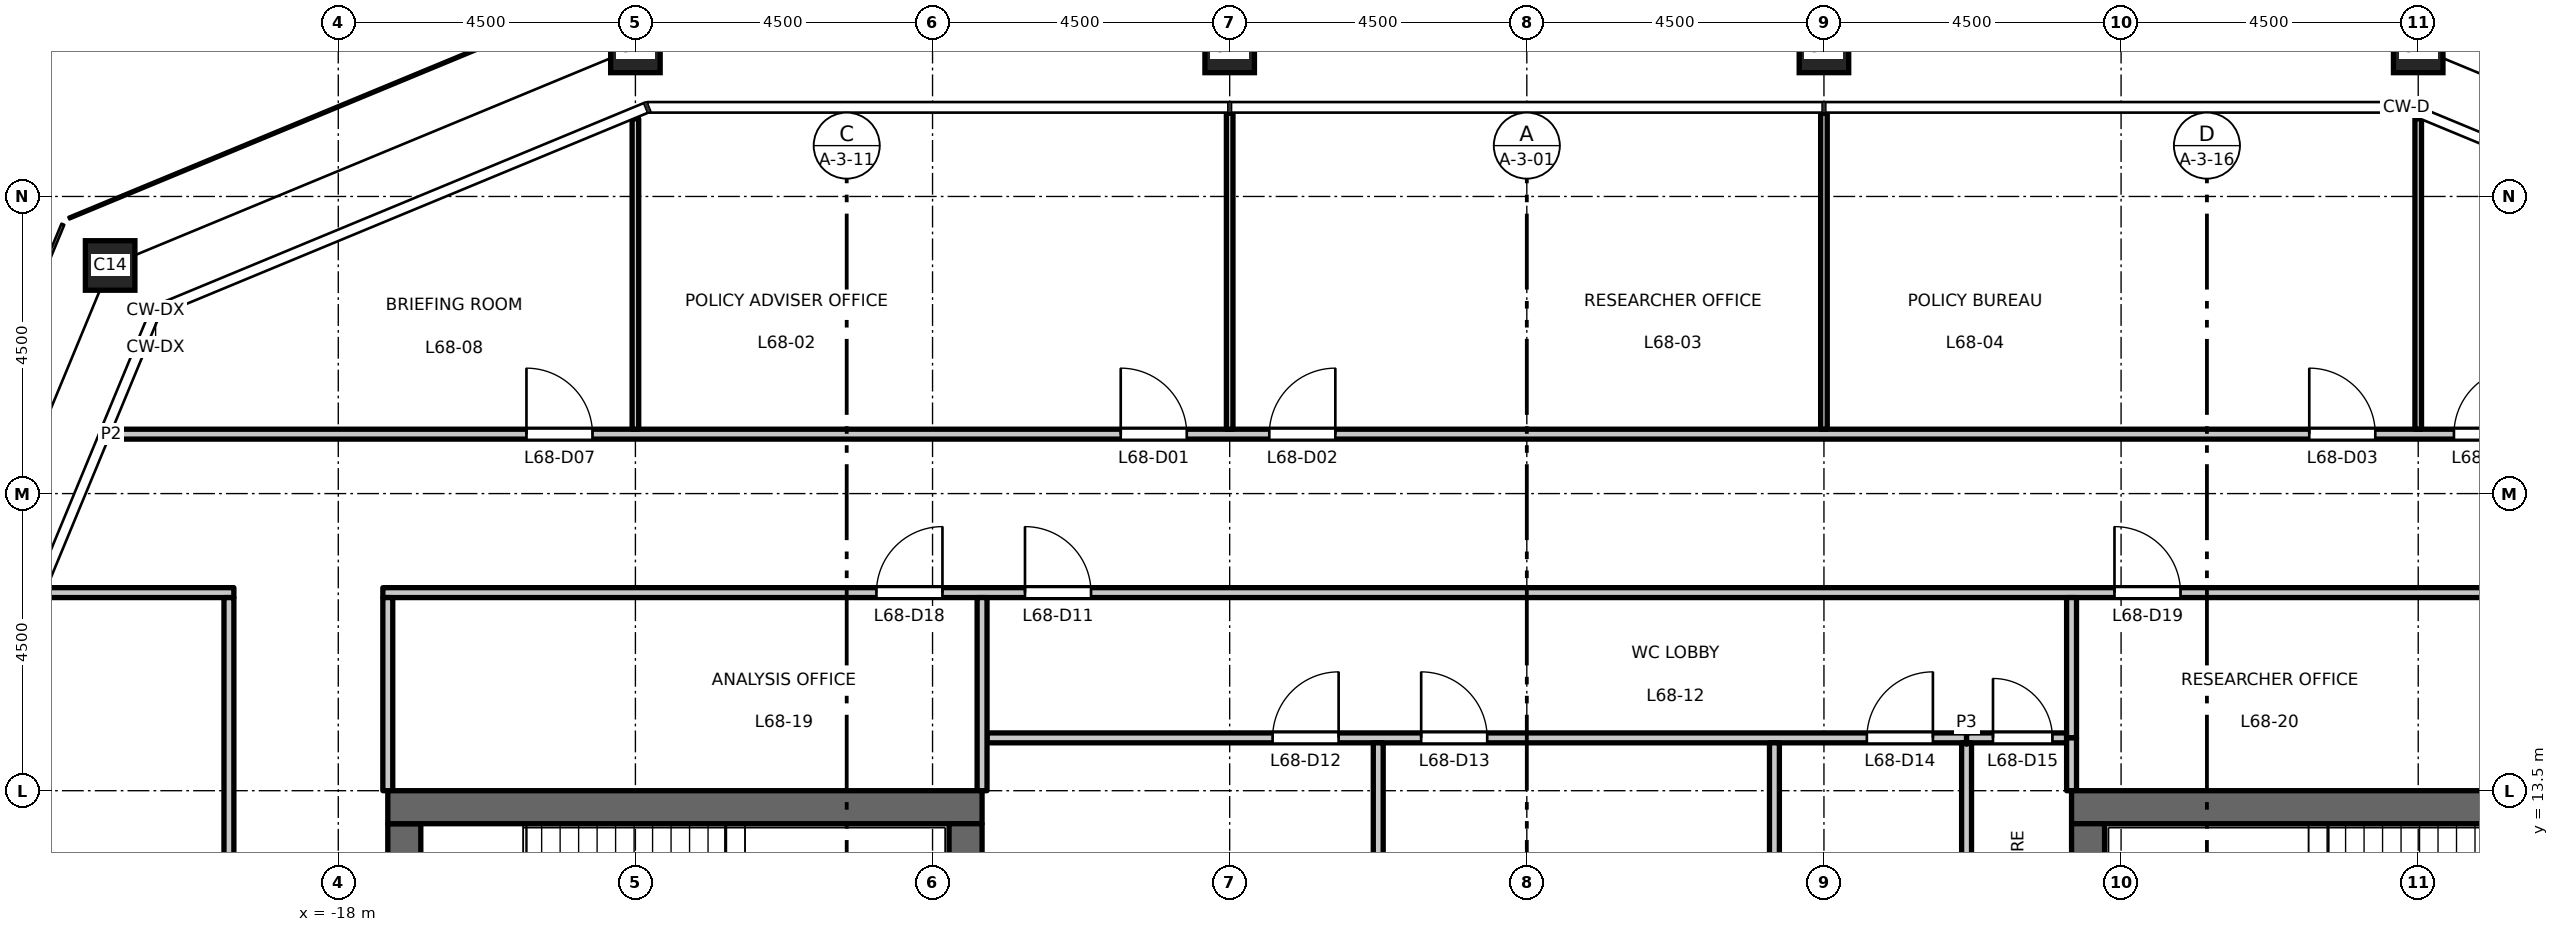
"""IFC4 building model, lengths in metres.
Left out: names, types, materials, properties, quantities, classifications, styles, units other than length and angle.
Written with IfcOpenShell. Run it as: python <this file> out.ifc"""

import sys

from ifc_helpers import new_model, si_unit, direction, frame, frame_2d, origin, origin_2d, place, context, subcontext, project, spatial, rectangle, hollow_rectangle, extrude, element, fill, save


model = new_model("IFC4")
c1 = context("Model", 3, precision=1e-05, world=origin(), true_north=direction((0.0, 1.0)))
c2 = subcontext(c1, "Body", "Model", "MODEL_VIEW")
j1 = project(units=[si_unit("LENGTHUNIT", "METRE"), si_unit("PLANEANGLEUNIT", "RADIAN")], contexts=[c1])
p1 = place(None, origin())
s1 = spatial("IfcSite", under=j1, at=p1, CompositionType="ELEMENT")
p2 = place(p1, origin())
s2 = spatial("IfcBuilding", under=s1, at=p2, CompositionType="ELEMENT")
p3 = place(p2, frame((0.0, 0.0, 316.7)))
s3 = spatial("IfcBuildingStorey", under=s2, at=p3, CompositionType="ELEMENT", Elevation=316.7)
for number, where, z_axis, x_axis in (
    (1, (13.5, 24.75, 0.0), (0.0, 0.0, 1.0), (1.0, 0.0, 0.0)),
    (2, (4.5, 24.75, 0.0), (0.0, 0.0, 1.0), (1.0, 0.0, 0.0)),
    (3, (-4.5, 24.75, 0.0), (0.0, 0.0, 1.0), (1.0, 0.0, 0.0)),
    (4, (-13.5, 24.75, 0.0), (0.0, 0.0, 1.0), (1.0, 0.0, 0.0)),
    (5, (-21.455, 21.455, 0.0), (0.0, 0.0, 1.0), (1.0, 0.0, 0.0)),
):
    element("IfcColumn", number, at=place(p3, frame(where, z_axis=z_axis, x_axis=x_axis)), inside=s3, PredefinedType="COLUMN", context=c2, shape_type="SweptSolid", body=[
        extrude(hollow_rectangle(XDim=0.75, YDim=0.75, WallThickness=0.04, at=origin_2d()), origin(), (0.0, 0.0, 1.0), 4.5),
    ])
p4 = place(p3, frame((-17.0, -13.0, 0.0), z_axis=(0.0, 0.0, 1.0), x_axis=(0.0, 1.0, 0.0)))
e6 = element("IfcWall", 6, at=p4, inside=s3, PredefinedType="SHEAR", context=c2, shape_type="SweptSolid", body=[
    extrude(rectangle(XDim=26.0, YDim=0.5, at=frame_2d((13.0, 0.0))), origin(), (0.0, 0.0, 1.0), 4.35),
])
p5 = place(p4, frame((16.825, 0.0, 0.0)))
e7 = element("IfcOpeningElement", 7, at=p5, cuts=e6, PredefinedType="OPENING", context=c2, shape_type="SweptSolid", body=[
    extrude(rectangle(XDim=1.8, YDim=2.1, at=frame_2d((0.9, 1.05))), frame((0.0, 0.26, 0.0), z_axis=(0.0, -1.0, 0.0), x_axis=(1.0, 0.0, 0.0)), (0.0, 0.0, 1.0), 0.52),
])
p6 = place(p4, frame((7.375, 0.0, 0.0)))
e8 = element("IfcOpeningElement", 8, at=p6, cuts=e6, PredefinedType="OPENING", context=c2, shape_type="SweptSolid", body=[
    extrude(rectangle(XDim=1.8, YDim=2.1, at=frame_2d((0.9, 1.05))), frame((0.0, 0.26, 0.0), z_axis=(0.0, -1.0, 0.0), x_axis=(1.0, 0.0, 0.0)), (0.0, 0.0, 1.0), 0.52),
])
p7 = place(p3, frame((-8.25, 13.25, 0.0), z_axis=(0.0, 0.0, 1.0), x_axis=(-1.0, 0.0, 0.0)))
e9 = element("IfcWall", 9, at=p7, inside=s3, PredefinedType="SHEAR", context=c2, shape_type="SweptSolid", body=[
    extrude(rectangle(XDim=9.0, YDim=0.5, at=frame_2d((4.5, 0.0))), origin(), (0.0, 0.0, 1.0), 4.35),
])
p8 = place(p3, frame((-8.5, -13.0, 0.0), z_axis=(0.0, 0.0, 1.0), x_axis=(0.0, 1.0, 0.0)))
e10 = element("IfcWall", 10, at=p8, inside=s3, PredefinedType="SHEAR", context=c2, shape_type="SweptSolid", body=[
    extrude(rectangle(XDim=26.0, YDim=0.5, at=frame_2d((13.0, 0.0))), origin(), (0.0, 0.0, 1.0), 4.35),
])
p9 = place(p3, frame((8.25, 13.25, 0.0), z_axis=(0.0, 0.0, 1.0), x_axis=(1.0, 0.0, 0.0)))
e11 = element("IfcWall", 11, at=p9, inside=s3, PredefinedType="SHEAR", context=c2, shape_type="SweptSolid", body=[
    extrude(rectangle(XDim=9.0, YDim=0.5, at=frame_2d((4.5, 0.0))), origin(), (0.0, 0.0, 1.0), 4.35),
])
p10 = place(p3, frame((8.5, -13.0, 0.0), z_axis=(0.0, 0.0, 1.0), x_axis=(0.0, 1.0, 0.0)))
e12 = element("IfcWall", 12, at=p10, inside=s3, PredefinedType="SHEAR", context=c2, shape_type="SweptSolid", body=[
    extrude(rectangle(XDim=26.0, YDim=0.5, at=frame_2d((13.0, 0.0))), origin(), (0.0, 0.0, 1.0), 4.35),
])
p11 = place(p3, frame((-8.175, 14.3, 0.0), z_axis=(0.0, 0.0, 1.0), x_axis=(1.0, 0.0, 0.0)))
e13 = element("IfcWall", 13, at=p11, inside=s3, PredefinedType="PARTITIONING", context=c2, shape_type="SweptSolid", body=[
    extrude(rectangle(XDim=14.835, YDim=0.15, at=frame_2d((7.417, 0.0))), origin(), (0.0, 0.0, 1.0), 4.35),
])
p12 = place(p11, frame((4.325, 0.0, 0.0)))
e14 = element("IfcOpeningElement", 14, at=p12, cuts=e13, PredefinedType="OPENING", context=c2, shape_type="SweptSolid", body=[
    extrude(rectangle(XDim=1.0, YDim=2.1, at=frame_2d((0.5, 1.05))), frame((0.0, 0.085, 0.0), z_axis=(0.0, -1.0, 0.0), x_axis=(1.0, 0.0, 0.0)), (0.0, 0.0, 1.0), 0.17),
])
p13 = place(p11, frame((6.575, 0.0, 0.0)))
e15 = element("IfcOpeningElement", 15, at=p13, cuts=e13, PredefinedType="OPENING", context=c2, shape_type="SweptSolid", body=[
    extrude(rectangle(XDim=1.0, YDim=2.1, at=frame_2d((0.5, 1.05))), frame((0.0, 0.085, 0.0), z_axis=(0.0, -1.0, 0.0), x_axis=(1.0, 0.0, 0.0)), (0.0, 0.0, 1.0), 0.17),
])
p14 = place(p11, frame((13.325, 0.0, 0.0)))
e16 = element("IfcOpeningElement", 16, at=p14, cuts=e13, PredefinedType="OPENING", context=c2, shape_type="SweptSolid", body=[
    extrude(rectangle(XDim=1.0, YDim=2.1, at=frame_2d((0.5, 1.05))), frame((0.0, 0.085, 0.0), z_axis=(0.0, -1.0, 0.0), x_axis=(1.0, 0.0, 0.0)), (0.0, 0.0, 1.0), 0.17),
])
p15 = place(p3, frame((6.66, 14.3, 0.0), z_axis=(0.0, 0.0, 1.0), x_axis=(1.0, 0.0, 0.0)))
e17 = element("IfcWall", 17, at=p15, inside=s3, PredefinedType="PARTITIONING", context=c2, shape_type="SweptSolid", body=[
    extrude(rectangle(XDim=1.515, YDim=0.15, at=frame_2d((0.758, 0.0))), origin(), (0.0, 0.0, 1.0), 4.35),
])
p16 = place(p15, frame((0.4, 0.0, 0.0)))
e18 = element("IfcOpeningElement", 18, at=p16, cuts=e17, PredefinedType="OPENING", context=c2, shape_type="SweptSolid", body=[
    extrude(rectangle(XDim=0.9, YDim=2.1, at=frame_2d((0.45, 1.05))), frame((0.0, 0.085, 0.0), z_axis=(0.0, -1.0, 0.0), x_axis=(1.0, 0.0, 0.0)), (0.0, 0.0, 1.0), 0.17),
])
p17 = place(p3, frame((-22.436, 16.5, 0.0), z_axis=(0.0, 0.0, 1.0), x_axis=(1.0, 0.0, 0.0)))
e19 = element("IfcWall", 19, at=p17, inside=s3, PredefinedType="PARTITIONING", context=c2, shape_type="SweptSolid", body=[
    extrude(rectangle(XDim=2.855, YDim=0.15, at=frame_2d((1.427, 0.0))), origin(), (0.0, 0.0, 1.0), 4.35),
])
p18 = place(p3, frame((-17.325, 16.5, 0.0), z_axis=(0.0, 0.0, 1.0), x_axis=(1.0, 0.0, 0.0)))
e20 = element("IfcWall", 20, at=p18, inside=s3, PredefinedType="PARTITIONING", context=c2, shape_type="SweptSolid", body=[
    extrude(rectangle(XDim=34.65, YDim=0.15, at=frame_2d((17.325, 0.0))), origin(), (0.0, 0.0, 1.0), 4.35),
])
p19 = place(p18, frame((9.725, 0.0, 0.0)))
e21 = element("IfcOpeningElement", 21, at=p19, cuts=e20, PredefinedType="OPENING", context=c2, shape_type="SweptSolid", body=[
    extrude(rectangle(XDim=1.0, YDim=2.1, at=frame_2d((0.5, 1.05))), frame((0.0, 0.085, 0.0), z_axis=(0.0, -1.0, 0.0), x_axis=(1.0, 0.0, 0.0)), (0.0, 0.0, 1.0), 0.17),
])
p20 = place(p18, frame((7.475, 0.0, 0.0)))
e22 = element("IfcOpeningElement", 22, at=p20, cuts=e20, PredefinedType="OPENING", context=c2, shape_type="SweptSolid", body=[
    extrude(rectangle(XDim=1.0, YDim=2.1, at=frame_2d((0.5, 1.05))), frame((0.0, 0.085, 0.0), z_axis=(0.0, -1.0, 0.0), x_axis=(1.0, 0.0, 0.0)), (0.0, 0.0, 1.0), 0.17),
])
p21 = place(p18, frame((26.225, 0.0, 0.0)))
e23 = element("IfcOpeningElement", 23, at=p21, cuts=e20, PredefinedType="OPENING", context=c2, shape_type="SweptSolid", body=[
    extrude(rectangle(XDim=1.0, YDim=2.1, at=frame_2d((0.5, 1.05))), frame((0.0, 0.085, 0.0), z_axis=(0.0, -1.0, 0.0), x_axis=(1.0, 0.0, 0.0)), (0.0, 0.0, 1.0), 0.17),
])
p22 = place(p3, frame((-21.441, 18.9, 0.0), z_axis=(0.0, 0.0, 1.0), x_axis=(1.0, 0.0, 0.0)))
e24 = element("IfcWall", 24, at=p22, inside=s3, PredefinedType="PARTITIONING", context=c2, shape_type="SweptSolid", body=[
    extrude(rectangle(XDim=42.882, YDim=0.15, at=frame_2d((21.441, 0.0))), origin(), (0.0, 0.0, 1.0), 4.35),
])
p23 = place(p22, frame((15.291, 0.0, 0.0)))
e25 = element("IfcOpeningElement", 25, at=p23, cuts=e24, PredefinedType="OPENING", context=c2, shape_type="SweptSolid", body=[
    extrude(rectangle(XDim=1.0, YDim=2.1, at=frame_2d((0.5, 1.05))), frame((0.0, 0.085, 0.0), z_axis=(0.0, -1.0, 0.0), x_axis=(1.0, 0.0, 0.0)), (0.0, 0.0, 1.0), 0.17),
])
p24 = place(p22, frame((17.541, 0.0, 0.0)))
e26 = element("IfcOpeningElement", 26, at=p24, cuts=e24, PredefinedType="OPENING", context=c2, shape_type="SweptSolid", body=[
    extrude(rectangle(XDim=1.0, YDim=2.1, at=frame_2d((0.5, 1.05))), frame((0.0, 0.085, 0.0), z_axis=(0.0, -1.0, 0.0), x_axis=(1.0, 0.0, 0.0)), (0.0, 0.0, 1.0), 0.17),
])
p25 = place(p22, frame((33.291, 0.0, 0.0)))
e27 = element("IfcOpeningElement", 27, at=p25, cuts=e24, PredefinedType="OPENING", context=c2, shape_type="SweptSolid", body=[
    extrude(rectangle(XDim=1.0, YDim=2.1, at=frame_2d((0.5, 1.05))), frame((0.0, 0.085, 0.0), z_axis=(0.0, -1.0, 0.0), x_axis=(1.0, 0.0, 0.0)), (0.0, 0.0, 1.0), 0.17),
])
p26 = place(p22, frame((6.291, 0.0, 0.0)))
e28 = element("IfcOpeningElement", 28, at=p26, cuts=e24, PredefinedType="OPENING", context=c2, shape_type="SweptSolid", body=[
    extrude(rectangle(XDim=1.0, YDim=2.1, at=frame_2d((0.5, 1.05))), frame((0.0, 0.085, 0.0), z_axis=(0.0, -1.0, 0.0), x_axis=(1.0, 0.0, 0.0)), (0.0, 0.0, 1.0), 0.17),
])
p27 = place(p22, frame((35.482, 0.0, 0.0)))
e29 = element("IfcOpeningElement", 29, at=p27, cuts=e24, PredefinedType="OPENING", context=c2, shape_type="SweptSolid", body=[
    extrude(rectangle(XDim=1.0, YDim=2.1, at=frame_2d((0.5, 1.05))), frame((0.0, 0.085, 0.0), z_axis=(0.0, -1.0, 0.0), x_axis=(1.0, 0.0, 0.0)), (0.0, 0.0, 1.0), 0.17),
])
p28 = place(p3, frame((-19.656, -16.42, 0.0), z_axis=(0.0, 0.0, 1.0), x_axis=(0.0, 1.0, 0.0)))
e30 = element("IfcWall", 30, at=p28, inside=s3, PredefinedType="PARTITIONING", context=c2, shape_type="SweptSolid", body=[
    extrude(rectangle(XDim=32.845, YDim=0.15, at=frame_2d((16.422, 0.0))), origin(), (0.0, 0.0, 1.0), 4.35),
])
p29 = place(p28, frame((0.52, 0.0, 0.0)))
e31 = element("IfcOpeningElement", 31, at=p29, cuts=e30, PredefinedType="OPENING", context=c2, shape_type="SweptSolid", body=[
    extrude(rectangle(XDim=1.0, YDim=2.1, at=frame_2d((0.5, 1.05))), frame((0.0, 0.085, 0.0), z_axis=(0.0, -1.0, 0.0), x_axis=(1.0, 0.0, 0.0)), (0.0, 0.0, 1.0), 0.17),
])
p30 = place(p28, frame((10.27, 0.0, 0.0)))
e32 = element("IfcOpeningElement", 32, at=p30, cuts=e30, PredefinedType="OPENING", context=c2, shape_type="SweptSolid", body=[
    extrude(rectangle(XDim=1.0, YDim=2.1, at=frame_2d((0.5, 1.05))), frame((0.0, 0.085, 0.0), z_axis=(0.0, -1.0, 0.0), x_axis=(1.0, 0.0, 0.0)), (0.0, 0.0, 1.0), 0.17),
])
p31 = place(p28, frame((12.52, 0.0, 0.0)))
e33 = element("IfcOpeningElement", 33, at=p31, cuts=e30, PredefinedType="OPENING", context=c2, shape_type="SweptSolid", body=[
    extrude(rectangle(XDim=1.0, YDim=2.1, at=frame_2d((0.5, 1.05))), frame((0.0, 0.085, 0.0), z_axis=(0.0, -1.0, 0.0), x_axis=(1.0, 0.0, 0.0)), (0.0, 0.0, 1.0), 0.17),
])
p32 = place(p3, frame((-17.25, 13.5, 0.0), z_axis=(0.0, 0.0, 1.0), x_axis=(0.0, 1.0, 0.0)))
e34 = element("IfcWall", 34, at=p32, inside=s3, PredefinedType="PARTITIONING", context=c2, shape_type="SweptSolid", body=[
    extrude(rectangle(XDim=2.925, YDim=0.15, at=frame_2d((1.462, 0.0))), origin(), (0.0, 0.0, 1.0), 4.35),
])
p33 = place(p3, frame((-13.5, 18.975, 0.0), z_axis=(0.0, 0.0, 1.0), x_axis=(0.0, 1.0, 0.0)))
e35 = element("IfcWall", 35, at=p33, inside=s3, PredefinedType="PARTITIONING", context=c2, shape_type="SweptSolid", body=[
    extrude(rectangle(XDim=4.703, YDim=0.1, at=frame_2d((2.352, 0.0))), origin(), (0.0, 0.0, 1.0), 3.75),
])
p34 = place(p3, frame((-8.25, 13.5, 0.0), z_axis=(0.0, 0.0, 1.0), x_axis=(0.0, 1.0, 0.0)))
e36 = element("IfcWall", 36, at=p34, inside=s3, PredefinedType="PARTITIONING", context=c2, shape_type="SweptSolid", body=[
    extrude(rectangle(XDim=2.925, YDim=0.15, at=frame_2d((1.462, 0.0))), origin(), (0.0, 0.0, 1.0), 4.35),
])
p35 = place(p3, frame((-4.5, 18.975, 0.0), z_axis=(0.0, 0.0, 1.0), x_axis=(0.0, 1.0, 0.0)))
e37 = element("IfcWall", 37, at=p35, inside=s3, PredefinedType="PARTITIONING", context=c2, shape_type="SweptSolid", body=[
    extrude(rectangle(XDim=4.785, YDim=0.1, at=frame_2d((2.393, 0.0))), origin(), (0.0, 0.0, 1.0), 3.65),
])
for number, where, z_axis, x_axis in (
    (38, (-2.25, 8.37, 0.0), (0.0, 0.0, 1.0), (0.0, 1.0, 0.0)),
    (39, (3.75, 8.37, 0.0), (0.0, 0.0, 1.0), (0.0, 1.0, 0.0)),
):
    element("IfcWall", number, at=place(p3, frame(where, z_axis=z_axis, x_axis=x_axis)), inside=s3, PredefinedType="PARTITIONING", context=c2, shape_type="SweptSolid", body=[
        extrude(rectangle(XDim=5.855, YDim=0.15, at=frame_2d((2.927, 0.0))), origin(), (0.0, 0.0, 1.0), 4.35),
    ])
p36 = place(p3, frame((4.5, 18.975, 0.0), z_axis=(0.0, 0.0, 1.0), x_axis=(0.0, 1.0, 0.0)))
e40 = element("IfcWall", 40, at=p36, inside=s3, PredefinedType="PARTITIONING", context=c2, shape_type="SweptSolid", body=[
    extrude(rectangle(XDim=4.785, YDim=0.1, at=frame_2d((2.393, 0.0))), origin(), (0.0, 0.0, 1.0), 3.65),
])
p37 = place(p3, frame((6.66, 8.127, 0.0), z_axis=(0.0, 0.0, 1.0), x_axis=(0.0, 1.0, 0.0)))
e41 = element("IfcWall", 41, at=p37, inside=s3, PredefinedType="PARTITIONING", context=c2, shape_type="SweptSolid", body=[
    extrude(rectangle(XDim=6.098, YDim=0.15, at=frame_2d((3.049, 0.0))), origin(), (0.0, 0.0, 1.0), 4.35),
])
p38 = place(p3, frame((8.25, 14.3, 0.0), z_axis=(0.0, 0.0, 1.0), x_axis=(0.0, 1.0, 0.0)))
e42 = element("IfcWall", 42, at=p38, inside=s3, PredefinedType="PARTITIONING", context=c2, shape_type="SweptSolid", body=[
    extrude(rectangle(XDim=2.125, YDim=0.15, at=frame_2d((1.062, 0.0))), origin(), (0.0, 0.0, 1.0), 4.35),
])
p39 = place(p3, frame((8.25, 13.5, 0.0), z_axis=(0.0, 0.0, 1.0), x_axis=(0.0, 1.0, 0.0)))
e43 = element("IfcWall", 43, at=p39, inside=s3, PredefinedType="PARTITIONING", context=c2, shape_type="SweptSolid", body=[
    extrude(rectangle(XDim=0.8, YDim=0.15, at=frame_2d((0.4, 0.0))), origin(), (0.0, 0.0, 1.0), 4.35),
])
p40 = place(p3, frame((13.5, 18.975, 0.0), z_axis=(0.0, 0.0, 1.0), x_axis=(0.0, 1.0, 0.0)))
e44 = element("IfcWall", 44, at=p40, inside=s3, PredefinedType="PARTITIONING", context=c2, shape_type="SweptSolid", body=[
    extrude(rectangle(XDim=4.703, YDim=0.1, at=frame_2d((2.352, 0.0))), origin(), (0.0, 0.0, 1.0), 3.75),
])
p41 = place(p23, origin())
e45 = element("IfcDoor", 45, at=p41, inside=s3, OperationType="SINGLE_SWING_LEFT", PredefinedType="DOOR", context=c2, shape_type="SweptSolid", body=[
    extrude(rectangle(XDim=1.0, YDim=2.1, at=frame_2d((0.5, 1.05))), frame((0.0, 0.025, 0.0), z_axis=(0.0, -1.0, 0.0), x_axis=(1.0, 0.0, 0.0)), (0.0, 0.0, 1.0), 0.05),
])
fill(e25, e45)
p42 = place(p24, origin())
e46 = element("IfcDoor", 46, at=p42, inside=s3, OperationType="SINGLE_SWING_RIGHT", PredefinedType="DOOR", context=c2, shape_type="SweptSolid", body=[
    extrude(rectangle(XDim=1.0, YDim=2.1, at=frame_2d((0.5, 1.05))), frame((0.0, 0.025, 0.0), z_axis=(0.0, -1.0, 0.0), x_axis=(1.0, 0.0, 0.0)), (0.0, 0.0, 1.0), 0.05),
])
fill(e26, e46)
p43 = place(p25, origin())
e47 = element("IfcDoor", 47, at=p43, inside=s3, OperationType="SINGLE_SWING_LEFT", PredefinedType="DOOR", context=c2, shape_type="SweptSolid", body=[
    extrude(rectangle(XDim=1.0, YDim=2.1, at=frame_2d((0.5, 1.05))), frame((0.0, 0.025, 0.0), z_axis=(0.0, -1.0, 0.0), x_axis=(1.0, 0.0, 0.0)), (0.0, 0.0, 1.0), 0.05),
])
fill(e27, e47)
p44 = place(p26, origin())
e48 = element("IfcDoor", 48, at=p44, inside=s3, OperationType="SINGLE_SWING_LEFT", PredefinedType="DOOR", context=c2, shape_type="SweptSolid", body=[
    extrude(rectangle(XDim=1.0, YDim=2.1, at=frame_2d((0.5, 1.05))), frame((0.0, 0.025, 0.0), z_axis=(0.0, -1.0, 0.0), x_axis=(1.0, 0.0, 0.0)), (0.0, 0.0, 1.0), 0.05),
])
fill(e28, e48)
p45 = place(p27, origin())
e49 = element("IfcDoor", 49, at=p45, inside=s3, OperationType="SINGLE_SWING_RIGHT", PredefinedType="DOOR", context=c2, shape_type="SweptSolid", body=[
    extrude(rectangle(XDim=1.0, YDim=2.1, at=frame_2d((0.5, 1.05))), frame((0.0, 0.025, 0.0), z_axis=(0.0, -1.0, 0.0), x_axis=(1.0, 0.0, 0.0)), (0.0, 0.0, 1.0), 0.05),
])
fill(e29, e49)
p46 = place(p19, origin())
e50 = element("IfcDoor", 50, at=p46, inside=s3, OperationType="SINGLE_SWING_LEFT", PredefinedType="DOOR", context=c2, shape_type="SweptSolid", body=[
    extrude(rectangle(XDim=1.0, YDim=2.1, at=frame_2d((0.5, 1.05))), frame((0.0, 0.025, 0.0), z_axis=(0.0, -1.0, 0.0), x_axis=(1.0, 0.0, 0.0)), (0.0, 0.0, 1.0), 0.05),
])
fill(e21, e50)
p47 = place(p12, origin())
e51 = element("IfcDoor", 51, at=p47, inside=s3, OperationType="SINGLE_SWING_RIGHT", PredefinedType="DOOR", context=c2, shape_type="SweptSolid", body=[
    extrude(rectangle(XDim=1.0, YDim=2.1, at=frame_2d((0.5, 1.05))), frame((0.0, 0.025, 0.0), z_axis=(0.0, -1.0, 0.0), x_axis=(1.0, 0.0, 0.0)), (0.0, 0.0, 1.0), 0.05),
])
fill(e14, e51)
p48 = place(p13, origin())
e52 = element("IfcDoor", 52, at=p48, inside=s3, OperationType="SINGLE_SWING_LEFT", PredefinedType="DOOR", context=c2, shape_type="SweptSolid", body=[
    extrude(rectangle(XDim=1.0, YDim=2.1, at=frame_2d((0.5, 1.05))), frame((0.0, 0.025, 0.0), z_axis=(0.0, -1.0, 0.0), x_axis=(1.0, 0.0, 0.0)), (0.0, 0.0, 1.0), 0.05),
])
fill(e15, e52)
p49 = place(p14, origin())
e53 = element("IfcDoor", 53, at=p49, inside=s3, OperationType="SINGLE_SWING_RIGHT", PredefinedType="DOOR", context=c2, shape_type="SweptSolid", body=[
    extrude(rectangle(XDim=1.0, YDim=2.1, at=frame_2d((0.5, 1.05))), frame((0.0, 0.025, 0.0), z_axis=(0.0, -1.0, 0.0), x_axis=(1.0, 0.0, 0.0)), (0.0, 0.0, 1.0), 0.05),
])
fill(e16, e53)
p50 = place(p16, origin())
e54 = element("IfcDoor", 54, at=p50, inside=s3, OperationType="SINGLE_SWING_LEFT", PredefinedType="DOOR", context=c2, shape_type="SweptSolid", body=[
    extrude(rectangle(XDim=0.9, YDim=2.1, at=frame_2d((0.45, 1.05))), frame((0.0, 0.025, 0.0), z_axis=(0.0, -1.0, 0.0), x_axis=(1.0, 0.0, 0.0)), (0.0, 0.0, 1.0), 0.05),
])
fill(e18, e54)
p51 = place(p20, origin())
e55 = element("IfcDoor", 55, at=p51, inside=s3, OperationType="SINGLE_SWING_RIGHT", PredefinedType="DOOR", context=c2, shape_type="SweptSolid", body=[
    extrude(rectangle(XDim=1.0, YDim=2.1, at=frame_2d((0.5, 1.05))), frame((0.0, 0.025, 0.0), z_axis=(0.0, -1.0, 0.0), x_axis=(1.0, 0.0, 0.0)), (0.0, 0.0, 1.0), 0.05),
])
fill(e22, e55)
p52 = place(p21, origin())
e56 = element("IfcDoor", 56, at=p52, inside=s3, OperationType="SINGLE_SWING_LEFT", PredefinedType="DOOR", context=c2, shape_type="SweptSolid", body=[
    extrude(rectangle(XDim=1.0, YDim=2.1, at=frame_2d((0.5, 1.05))), frame((0.0, 0.025, 0.0), z_axis=(0.0, -1.0, 0.0), x_axis=(1.0, 0.0, 0.0)), (0.0, 0.0, 1.0), 0.05),
])
fill(e23, e56)
save(model, sys.argv[1])
